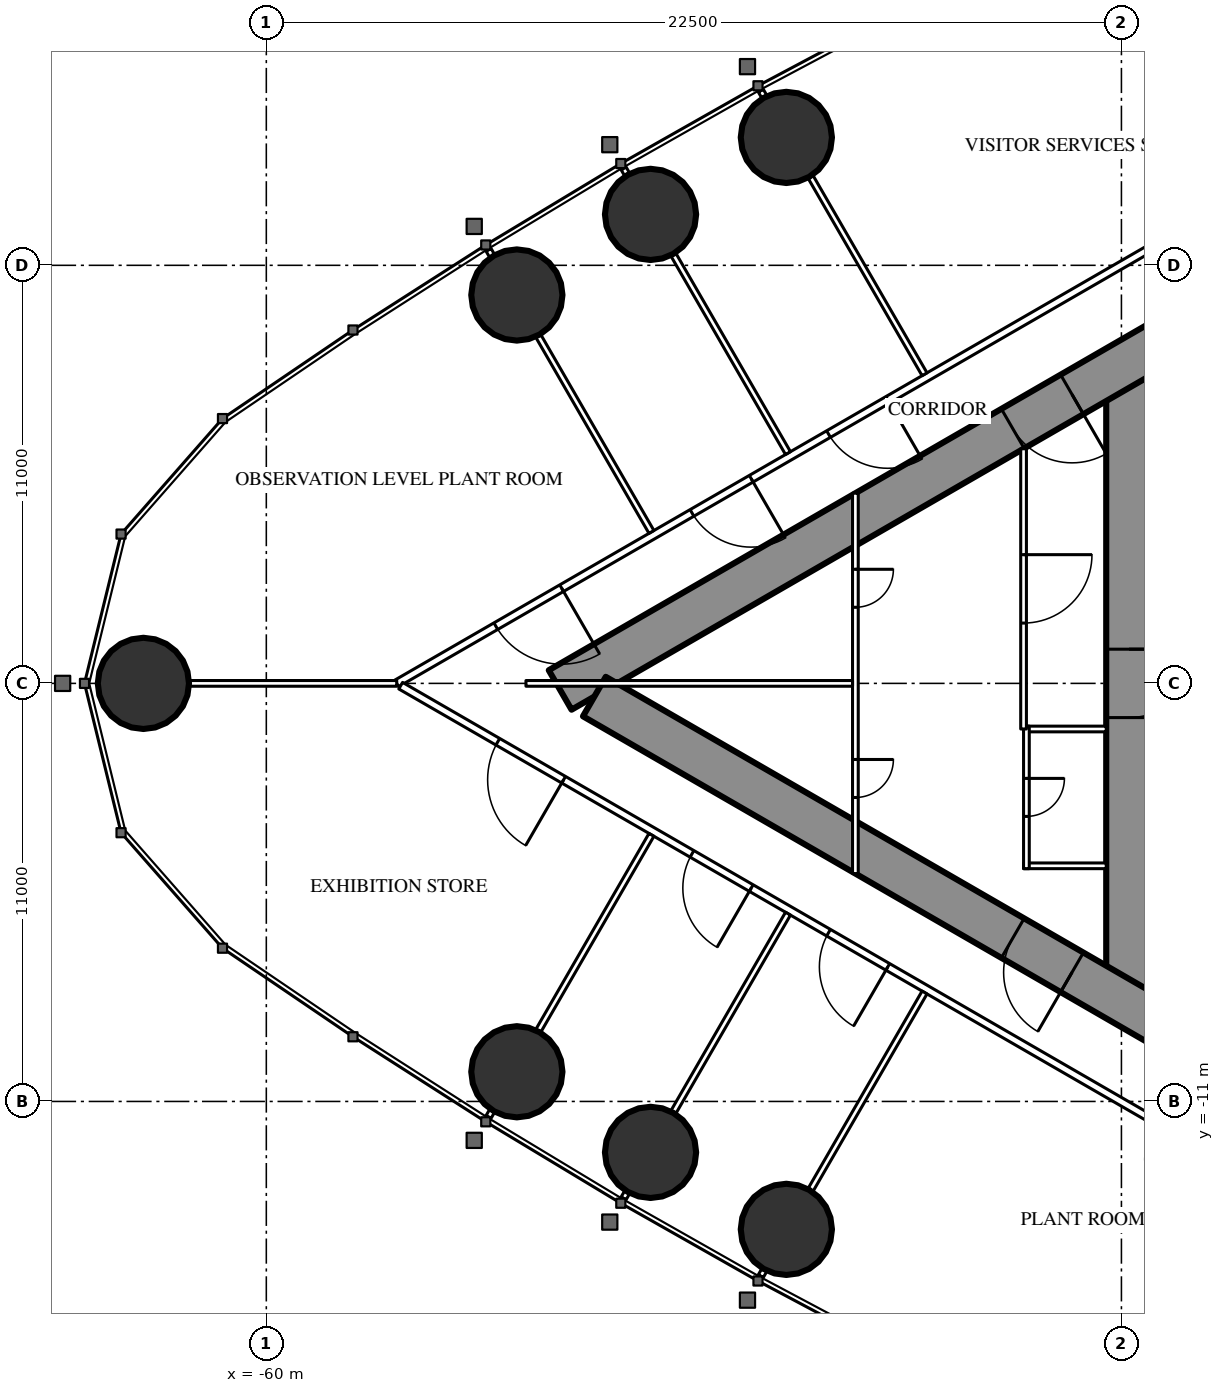
"""IFC4 building model, lengths in metres.
Left out: names, types, materials, properties, quantities, classifications, styles, units other than length and angle.
Written with IfcOpenShell. Run it as: python <this file> out.ifc"""

import sys

from ifc_helpers import new_model, si_unit, direction, frame, frame_2d, origin, origin_2d, place, context, subcontext, project, spatial, rectangle, circle, extrude, element, fill, save


model = new_model("IFC4")
c1 = context("Model", 3, precision=1e-05, world=origin(), true_north=direction((0.0, 1.0)))
c2 = subcontext(c1, "Body", "Model", "MODEL_VIEW")
j1 = project(units=[si_unit("LENGTHUNIT", "METRE"), si_unit("PLANEANGLEUNIT", "RADIAN")], contexts=[c1])
p1 = place(None, origin())
s1 = spatial("IfcSite", under=j1, at=p1, CompositionType="ELEMENT")
p2 = place(p1, origin())
s2 = spatial("IfcBuilding", under=s1, at=p2, CompositionType="ELEMENT")
p3 = place(p2, frame((0.0, 0.0, 257.3)))
s3 = spatial("IfcBuildingStorey", under=s2, at=p3, CompositionType="ELEMENT", Elevation=257.3)
for number, where, z_axis, x_axis in (
    (1, (-63.234, 0.0, 0.0), (0.0, 0.0, 1.0), (1.0, 0.0, 0.0)),
    (2, (-53.408, -10.219, 0.0), (0.0, 0.0, 1.0), (1.0, 0.0, 0.0)),
    (3, (-49.89, -12.34, 0.0), (0.0, 0.0, 1.0), (1.0, 0.0, 0.0)),
    (4, (-46.317, -14.365, 0.0), (0.0, 0.0, 1.0), (1.0, 0.0, 0.0)),
    (5, (-46.317, 14.365, 0.0), (0.0, 0.0, 1.0), (1.0, 0.0, 0.0)),
    (6, (-49.89, 12.34, 0.0), (0.0, 0.0, 1.0), (1.0, 0.0, 0.0)),
    (7, (-53.408, 10.219, 0.0), (0.0, 0.0, 1.0), (1.0, 0.0, 0.0)),
):
    element("IfcColumn", number, at=place(p3, frame(where, z_axis=z_axis, x_axis=x_axis)), inside=s3, PredefinedType="COLUMN", context=c2, shape_type="SweptSolid", body=[
        extrude(circle(Radius=1.2, at=origin_2d()), origin(), (0.0, 0.0, 1.0), 6.0),
    ])
p4 = place(p3, frame((-37.3, 8.6, 0.0), z_axis=(0.0, 0.0, 1.0), x_axis=(0.0, -1.0, 0.0)))
e8 = element("IfcWall", 8, at=p4, inside=s3, PredefinedType="SHEAR", context=c2, shape_type="SweptSolid", body=[
    extrude(rectangle(XDim=17.2, YDim=1.2, at=frame_2d((8.6, 0.0))), origin(), (0.0, 0.0, 1.0), 6.0),
])
p5 = place(p4, frame((7.7, 0.0, 0.0)))
e9 = element("IfcOpeningElement", 9, at=p5, cuts=e8, PredefinedType="OPENING", context=c2, shape_type="SweptSolid", body=[
    extrude(rectangle(XDim=1.8, YDim=2.2, at=frame_2d((0.9, 1.1))), frame((0.0, 0.61, 0.0), z_axis=(0.0, -1.0, 0.0), x_axis=(1.0, 0.0, 0.0)), (0.0, 0.0, 1.0), 1.22),
])
p6 = place(p3, frame((-27.2, 14.3, 0.0), z_axis=(0.0, 0.0, 1.0), x_axis=(-0.866026593062, -0.499997940104, 0.0)))
e10 = element("IfcWall", 10, at=p6, inside=s3, PredefinedType="SHEAR", context=c2, shape_type="SweptSolid", body=[
    extrude(rectangle(XDim=28.946, YDim=1.2, at=frame_2d((14.473, 0.0))), origin(), (0.0, 0.0, 1.0), 6.0),
])
p7 = place(p6, frame((4.6, 0.0, 0.0)))
e11 = element("IfcOpeningElement", 11, at=p7, cuts=e10, PredefinedType="OPENING", context=c2, shape_type="SweptSolid", body=[
    extrude(rectangle(XDim=1.0, YDim=2.2, at=frame_2d((0.5, 1.1))), frame((0.0, 0.61, 0.0), z_axis=(0.0, -1.0, 0.0), x_axis=(1.0, 0.0, 0.0)), (0.0, 0.0, 1.0), 1.22),
])
p8 = place(p6, frame((13.395, 0.0, 0.0)))
e12 = element("IfcOpeningElement", 12, at=p8, cuts=e10, PredefinedType="OPENING", context=c2, shape_type="SweptSolid", body=[
    extrude(rectangle(XDim=1.8, YDim=2.2, at=frame_2d((0.9, 1.1))), frame((0.0, 0.61, 0.0), z_axis=(0.0, -1.0, 0.0), x_axis=(1.0, 0.0, 0.0)), (0.0, 0.0, 1.0), 1.22),
])
p9 = place(p3, frame((-27.2, -14.3, 0.0), z_axis=(0.0, 0.0, 1.0), x_axis=(-0.866024021859, 0.500002393557, 0.0)))
e13 = element("IfcWall", 13, at=p9, inside=s3, PredefinedType="SHEAR", context=c2, shape_type="SweptSolid", body=[
    extrude(rectangle(XDim=27.907, YDim=1.2, at=frame_2d((13.954, 0.0))), origin(), (0.0, 0.0, 1.0), 6.0),
])
p10 = place(p9, frame((4.6, 0.0, 0.0)))
e14 = element("IfcOpeningElement", 14, at=p10, cuts=e13, PredefinedType="OPENING", context=c2, shape_type="SweptSolid", body=[
    extrude(rectangle(XDim=1.0, YDim=2.2, at=frame_2d((0.5, 1.1))), frame((0.0, 0.61, 0.0), z_axis=(0.0, -1.0, 0.0), x_axis=(1.0, 0.0, 0.0)), (0.0, 0.0, 1.0), 1.22),
])
p11 = place(p9, frame((13.395, 0.0, 0.0)))
e15 = element("IfcOpeningElement", 15, at=p11, cuts=e13, PredefinedType="OPENING", context=c2, shape_type="SweptSolid", body=[
    extrude(rectangle(XDim=1.8, YDim=2.2, at=frame_2d((0.9, 1.1))), frame((0.0, 0.61, 0.0), z_axis=(0.0, -1.0, 0.0), x_axis=(1.0, 0.0, 0.0)), (0.0, 0.0, 1.0), 1.22),
])
p12 = place(p3, frame((-28.681, 16.101, 0.0), z_axis=(0.0, 0.0, 1.0), x_axis=(-0.866024860443, -0.500000941094, 0.0)))
e16 = element("IfcWall", 16, at=p12, inside=s3, PredefinedType="PARTITIONING", context=c2, shape_type="SweptSolid", body=[
    extrude(rectangle(XDim=32.201, YDim=0.2, at=frame_2d((16.101, 0.0))), origin(), (0.0, 0.0, 1.0), 5.75),
])
p13 = place(p12, frame((7.166, 0.0, 0.0)))
e17 = element("IfcOpeningElement", 17, at=p13, cuts=e16, PredefinedType="OPENING", context=c2, shape_type="SweptSolid", body=[
    extrude(rectangle(XDim=2.0, YDim=2.4, at=frame_2d((1.0, 1.2))), frame((0.0, 0.11, 0.0), z_axis=(0.0, -1.0, 0.0), x_axis=(1.0, 0.0, 0.0)), (0.0, 0.0, 1.0), 0.22),
])
p14 = place(p12, frame((17.281, 0.0, 0.0)))
e18 = element("IfcOpeningElement", 18, at=p14, cuts=e16, PredefinedType="OPENING", context=c2, shape_type="SweptSolid", body=[
    extrude(rectangle(XDim=1.8, YDim=2.2, at=frame_2d((0.9, 1.1))), frame((0.0, 0.11, 0.0), z_axis=(0.0, -1.0, 0.0), x_axis=(1.0, 0.0, 0.0)), (0.0, 0.0, 1.0), 0.22),
])
p15 = place(p12, frame((21.43, 0.0, 0.0)))
e19 = element("IfcOpeningElement", 19, at=p15, cuts=e16, PredefinedType="OPENING", context=c2, shape_type="SweptSolid", body=[
    extrude(rectangle(XDim=1.8, YDim=2.2, at=frame_2d((0.9, 1.1))), frame((0.0, 0.11, 0.0), z_axis=(0.0, -1.0, 0.0), x_axis=(1.0, 0.0, 0.0)), (0.0, 0.0, 1.0), 0.22),
])
p16 = place(p12, frame((27.19, 0.0, 0.0)))
e20 = element("IfcOpeningElement", 20, at=p16, cuts=e16, PredefinedType="OPENING", context=c2, shape_type="SweptSolid", body=[
    extrude(rectangle(XDim=2.0, YDim=2.4, at=frame_2d((1.0, 1.2))), frame((0.0, 0.11, 0.0), z_axis=(0.0, -1.0, 0.0), x_axis=(1.0, 0.0, 0.0)), (0.0, 0.0, 1.0), 0.22),
])
p17 = place(p3, frame((-28.681, -16.101, 0.0), z_axis=(0.0, 0.0, 1.0), x_axis=(-0.86602501917, 0.50000066617, 0.0)))
e21 = element("IfcWall", 21, at=p17, inside=s3, PredefinedType="PARTITIONING", context=c2, shape_type="SweptSolid", body=[
    extrude(rectangle(XDim=32.081, YDim=0.2, at=frame_2d((16.041, 0.0))), origin(), (0.0, 0.0, 1.0), 5.75),
])
p18 = place(p17, frame((27.13, 0.0, 0.0)))
e22 = element("IfcOpeningElement", 22, at=p18, cuts=e21, PredefinedType="OPENING", context=c2, shape_type="SweptSolid", body=[
    extrude(rectangle(XDim=2.0, YDim=2.4, at=frame_2d((1.0, 1.2))), frame((0.0, 0.11, 0.0), z_axis=(0.0, -1.0, 0.0), x_axis=(1.0, 0.0, 0.0)), (0.0, 0.0, 1.0), 0.22),
])
p19 = place(p17, frame((21.43, 0.0, 0.0)))
e23 = element("IfcOpeningElement", 23, at=p19, cuts=e21, PredefinedType="OPENING", context=c2, shape_type="SweptSolid", body=[
    extrude(rectangle(XDim=1.8, YDim=2.2, at=frame_2d((0.9, 1.1))), frame((0.0, 0.11, 0.0), z_axis=(0.0, -1.0, 0.0), x_axis=(1.0, 0.0, 0.0)), (0.0, 0.0, 1.0), 0.22),
])
p20 = place(p17, frame((17.281, 0.0, 0.0)))
e24 = element("IfcOpeningElement", 24, at=p20, cuts=e21, PredefinedType="OPENING", context=c2, shape_type="SweptSolid", body=[
    extrude(rectangle(XDim=1.8, YDim=2.2, at=frame_2d((0.9, 1.1))), frame((0.0, 0.11, 0.0), z_axis=(0.0, -1.0, 0.0), x_axis=(1.0, 0.0, 0.0)), (0.0, 0.0, 1.0), 0.22),
])
p21 = place(p17, frame((7.166, 0.0, 0.0)))
e25 = element("IfcOpeningElement", 25, at=p21, cuts=e21, PredefinedType="OPENING", context=c2, shape_type="SweptSolid", body=[
    extrude(rectangle(XDim=2.0, YDim=2.4, at=frame_2d((1.0, 1.2))), frame((0.0, 0.11, 0.0), z_axis=(0.0, -1.0, 0.0), x_axis=(1.0, 0.0, 0.0)), (0.0, 0.0, 1.0), 0.22),
])
p22 = place(p3, frame((-42.68, 8.134, 0.0), z_axis=(0.0, 0.0, 1.0), x_axis=(-0.499984479505, 0.866034364361, 0.0)))
e26 = element("IfcWall", 26, at=p22, inside=s3, PredefinedType="PARTITIONING", context=c2, shape_type="SweptSolid", body=[
    extrude(rectangle(XDim=5.995, YDim=0.15, at=frame_2d((2.998, 0.0))), origin(), (0.0, 0.0, 1.0), 4.85),
])
p23 = place(p3, frame((-46.898, 15.439, 0.0), z_axis=(0.0, 0.0, 1.0), x_axis=(-0.500232303069, 0.865891241997, 0.0)))
e27 = element("IfcWall", 27, at=p23, inside=s3, PredefinedType="PARTITIONING", context=c2, shape_type="SweptSolid", body=[
    extrude(rectangle(XDim=0.18, YDim=0.15, at=frame_2d((0.09, 0.0))), origin(), (0.0, 0.0, 1.0), 4.85),
])
p24 = place(p3, frame((-46.274, 6.059, 0.0), z_axis=(0.0, 0.0, 1.0), x_axis=(-0.500020471368, 0.866013584312, 0.0)))
e28 = element("IfcWall", 28, at=p24, inside=s3, PredefinedType="PARTITIONING", context=c2, shape_type="SweptSolid", body=[
    extrude(rectangle(XDim=6.028, YDim=0.15, at=frame_2d((3.014, 0.0))), origin(), (0.0, 0.0, 1.0), 4.85),
])
p25 = place(p3, frame((-50.508, 13.392, 0.0), z_axis=(0.0, 0.0, 1.0), x_axis=(-0.499644091975, 0.866230789891, 0.0)))
e29 = element("IfcWall", 29, at=p25, inside=s3, PredefinedType="PARTITIONING", context=c2, shape_type="SweptSolid", body=[
    extrude(rectangle(XDim=0.18, YDim=0.15, at=frame_2d((0.09, 0.0))), origin(), (0.0, 0.0, 1.0), 4.85),
])
p26 = place(p3, frame((-49.866, 3.985, 0.0), z_axis=(0.0, 0.0, 1.0), x_axis=(-0.500000694566, 0.866025002776, 0.0)))
e30 = element("IfcWall", 30, at=p26, inside=s3, PredefinedType="PARTITIONING", context=c2, shape_type="SweptSolid", body=[
    extrude(rectangle(XDim=5.95, YDim=0.15, at=frame_2d((2.975, 0.0))), origin(), (0.0, 0.0, 1.0), 4.85),
])
p27 = place(p3, frame((-54.061, 11.25, 0.0), z_axis=(0.0, 0.0, 1.0), x_axis=(-0.500391173478, 0.865799441849, 0.0)))
e31 = element("IfcWall", 31, at=p27, inside=s3, PredefinedType="PARTITIONING", context=c2, shape_type="SweptSolid", body=[
    extrude(rectangle(XDim=0.179, YDim=0.15, at=frame_2d((0.089, 0.0))), origin(), (0.0, 0.0, 1.0), 4.85),
])
p28 = place(p3, frame((-42.68, -8.134, 0.0), z_axis=(0.0, 0.0, 1.0), x_axis=(-0.499984479505, -0.866034364361, 0.0)))
e32 = element("IfcWall", 32, at=p28, inside=s3, PredefinedType="PARTITIONING", context=c2, shape_type="SweptSolid", body=[
    extrude(rectangle(XDim=5.995, YDim=0.15, at=frame_2d((2.998, 0.0))), origin(), (0.0, 0.0, 1.0), 4.85),
])
p29 = place(p3, frame((-46.898, -15.439, 0.0), z_axis=(0.0, 0.0, 1.0), x_axis=(-0.500232303069, -0.865891241997, 0.0)))
e33 = element("IfcWall", 33, at=p29, inside=s3, PredefinedType="PARTITIONING", context=c2, shape_type="SweptSolid", body=[
    extrude(rectangle(XDim=0.18, YDim=0.15, at=frame_2d((0.09, 0.0))), origin(), (0.0, 0.0, 1.0), 4.85),
])
p30 = place(p3, frame((-46.274, -6.059, 0.0), z_axis=(0.0, 0.0, 1.0), x_axis=(-0.500020471368, -0.866013584312, 0.0)))
e34 = element("IfcWall", 34, at=p30, inside=s3, PredefinedType="PARTITIONING", context=c2, shape_type="SweptSolid", body=[
    extrude(rectangle(XDim=6.028, YDim=0.15, at=frame_2d((3.014, 0.0))), origin(), (0.0, 0.0, 1.0), 4.85),
])
p31 = place(p3, frame((-50.508, -13.392, 0.0), z_axis=(0.0, 0.0, 1.0), x_axis=(-0.499644091975, -0.866230789891, 0.0)))
e35 = element("IfcWall", 35, at=p31, inside=s3, PredefinedType="PARTITIONING", context=c2, shape_type="SweptSolid", body=[
    extrude(rectangle(XDim=0.18, YDim=0.15, at=frame_2d((0.09, 0.0))), origin(), (0.0, 0.0, 1.0), 4.85),
])
p32 = place(p3, frame((-49.866, -3.985, 0.0), z_axis=(0.0, 0.0, 1.0), x_axis=(-0.500000694566, -0.866025002776, 0.0)))
e36 = element("IfcWall", 36, at=p32, inside=s3, PredefinedType="PARTITIONING", context=c2, shape_type="SweptSolid", body=[
    extrude(rectangle(XDim=5.95, YDim=0.15, at=frame_2d((2.975, 0.0))), origin(), (0.0, 0.0, 1.0), 4.85),
])
p33 = place(p3, frame((-54.061, -11.25, 0.0), z_axis=(0.0, 0.0, 1.0), x_axis=(-0.500391173478, -0.865799441849, 0.0)))
e37 = element("IfcWall", 37, at=p33, inside=s3, PredefinedType="PARTITIONING", context=c2, shape_type="SweptSolid", body=[
    extrude(rectangle(XDim=0.179, YDim=0.15, at=frame_2d((0.089, 0.0))), origin(), (0.0, 0.0, 1.0), 4.85),
])
p34 = place(p3, frame((-56.568, 0.0, 0.0), z_axis=(0.0, 0.0, 1.0), x_axis=(-1.0, 0.0, 0.0)))
e38 = element("IfcWall", 38, at=p34, inside=s3, PredefinedType="PARTITIONING", context=c2, shape_type="SweptSolid", body=[
    extrude(rectangle(XDim=5.446, YDim=0.15, at=frame_2d((2.723, 0.0))), origin(), (0.0, 0.0, 1.0), 4.85),
])
for number, where, z_axis, x_axis in (
    (39, (-37.9, -1.2, 0.0), (0.0, 0.0, 1.0), (-1.0, 0.0, 0.0)),
    (40, (-37.9, -4.8, 0.0), (0.0, 0.0, 1.0), (-1.0, 0.0, 0.0)),
):
    element("IfcWall", number, at=place(p3, frame(where, z_axis=z_axis, x_axis=x_axis)), inside=s3, PredefinedType="PARTITIONING", context=c2, shape_type="SweptSolid", body=[
        extrude(rectangle(XDim=2.175, YDim=0.15, at=frame_2d((1.087, 0.0))), origin(), (0.0, 0.0, 1.0), 5.75),
    ])
p35 = place(p3, frame((-40.0, -1.125, 0.0), z_axis=(0.0, 0.0, 1.0), x_axis=(0.0, -1.0, 0.0)))
e41 = element("IfcWall", 41, at=p35, inside=s3, PredefinedType="PARTITIONING", context=c2, shape_type="SweptSolid", body=[
    extrude(rectangle(XDim=3.75, YDim=0.15, at=frame_2d((1.875, 0.0))), origin(), (0.0, 0.0, 1.0), 5.75),
])
p36 = place(p35, frame((1.375, 0.0, 0.0)))
e42 = element("IfcOpeningElement", 42, at=p36, cuts=e41, PredefinedType="OPENING", context=c2, shape_type="SweptSolid", body=[
    extrude(rectangle(XDim=1.0, YDim=2.2, at=frame_2d((0.5, 1.1))), frame((0.0, 0.085, 0.0), z_axis=(0.0, -1.0, 0.0), x_axis=(1.0, 0.0, 0.0)), (0.0, 0.0, 1.0), 0.17),
])
p37 = place(p3, frame((-40.075, 6.174, 0.0), z_axis=(0.0, 0.0, 1.0), x_axis=(0.0, -1.0, 0.0)))
e43 = element("IfcWall", 43, at=p37, inside=s3, PredefinedType="PARTITIONING", context=c2, shape_type="SweptSolid", body=[
    extrude(rectangle(XDim=7.374, YDim=0.15, at=frame_2d((3.687, 0.0))), origin(), (0.0, 0.0, 1.0), 5.75),
])
p38 = place(p37, frame((2.787, 0.0, 0.0)))
e44 = element("IfcOpeningElement", 44, at=p38, cuts=e43, PredefinedType="OPENING", context=c2, shape_type="SweptSolid", body=[
    extrude(rectangle(XDim=1.8, YDim=2.2, at=frame_2d((0.9, 1.1))), frame((0.0, 0.085, 0.0), z_axis=(0.0, -1.0, 0.0), x_axis=(1.0, 0.0, 0.0)), (0.0, 0.0, 1.0), 0.17),
])
p39 = place(p3, frame((-44.5, 5.005, 0.0), z_axis=(0.0, 0.0, 1.0), x_axis=(0.0, -1.0, 0.0)))
e45 = element("IfcWall", 45, at=p39, inside=s3, PredefinedType="PARTITIONING", context=c2, shape_type="SweptSolid", body=[
    extrude(rectangle(XDim=10.009, YDim=0.15, at=frame_2d((5.005, 0.0))), origin(), (0.0, 0.0, 1.0), 4.9),
])
p40 = place(p39, frame((2.002, 0.0, 0.0)))
e46 = element("IfcOpeningElement", 46, at=p40, cuts=e45, PredefinedType="OPENING", context=c2, shape_type="SweptSolid", body=[
    extrude(rectangle(XDim=1.0, YDim=2.2, at=frame_2d((0.5, 1.1))), frame((0.0, 0.085, 0.0), z_axis=(0.0, -1.0, 0.0), x_axis=(1.0, 0.0, 0.0)), (0.0, 0.0, 1.0), 0.17),
])
p41 = place(p39, frame((7.007, 0.0, 0.0)))
e47 = element("IfcOpeningElement", 47, at=p41, cuts=e45, PredefinedType="OPENING", context=c2, shape_type="SweptSolid", body=[
    extrude(rectangle(XDim=1.0, YDim=2.2, at=frame_2d((0.5, 1.1))), frame((0.0, 0.085, 0.0), z_axis=(0.0, -1.0, 0.0), x_axis=(1.0, 0.0, 0.0)), (0.0, 0.0, 1.0), 0.17),
])
p42 = place(p3, frame((-44.575, 0.0, 0.0), z_axis=(0.0, 0.0, 1.0), x_axis=(-1.0, 0.0, 0.0)))
e48 = element("IfcWall", 48, at=p42, inside=s3, PredefinedType="PARTITIONING", context=c2, shape_type="SweptSolid", body=[
    extrude(rectangle(XDim=8.593, YDim=0.15, at=frame_2d((4.297, 0.0))), origin(), (0.0, 0.0, 1.0), 4.85),
])
p43 = place(p14, origin())
e49 = element("IfcDoor", 49, at=p43, inside=s3, OperationType="DOUBLE_DOOR_SINGLE_SWING", PredefinedType="DOOR", context=c2, shape_type="SweptSolid", body=[
    extrude(rectangle(XDim=1.8, YDim=2.2, at=frame_2d((0.9, 1.1))), frame((0.0, 0.025, 0.0), z_axis=(0.0, -1.0, 0.0), x_axis=(1.0, 0.0, 0.0)), (0.0, 0.0, 1.0), 0.05),
])
fill(e18, e49)
p44 = place(p15, origin())
e50 = element("IfcDoor", 50, at=p44, inside=s3, OperationType="DOUBLE_DOOR_SINGLE_SWING", PredefinedType="DOOR", context=c2, shape_type="SweptSolid", body=[
    extrude(rectangle(XDim=1.8, YDim=2.2, at=frame_2d((0.9, 1.1))), frame((0.0, 0.025, 0.0), z_axis=(0.0, -1.0, 0.0), x_axis=(1.0, 0.0, 0.0)), (0.0, 0.0, 1.0), 0.05),
])
fill(e19, e50)
p45 = place(p16, origin())
e51 = element("IfcDoor", 51, at=p45, inside=s3, OperationType="DOUBLE_DOOR_SINGLE_SWING", PredefinedType="DOOR", context=c2, shape_type="SweptSolid", body=[
    extrude(rectangle(XDim=2.0, YDim=2.4, at=frame_2d((1.0, 1.2))), frame((0.0, 0.025, 0.0), z_axis=(0.0, -1.0, 0.0), x_axis=(1.0, 0.0, 0.0)), (0.0, 0.0, 1.0), 0.05),
])
fill(e20, e51)
p46 = place(p18, origin())
e52 = element("IfcDoor", 52, at=p46, inside=s3, OperationType="DOUBLE_DOOR_SINGLE_SWING", PredefinedType="DOOR", context=c2, shape_type="SweptSolid", body=[
    extrude(rectangle(XDim=2.0, YDim=2.4, at=frame_2d((1.0, 1.2))), frame((0.0, 0.025, 0.0), z_axis=(0.0, -1.0, 0.0), x_axis=(1.0, 0.0, 0.0)), (0.0, 0.0, 1.0), 0.05),
])
fill(e22, e52)
p47 = place(p19, origin())
e53 = element("IfcDoor", 53, at=p47, inside=s3, OperationType="DOUBLE_DOOR_SINGLE_SWING", PredefinedType="DOOR", context=c2, shape_type="SweptSolid", body=[
    extrude(rectangle(XDim=1.8, YDim=2.2, at=frame_2d((0.9, 1.1))), frame((0.0, 0.025, 0.0), z_axis=(0.0, -1.0, 0.0), x_axis=(1.0, 0.0, 0.0)), (0.0, 0.0, 1.0), 0.05),
])
fill(e23, e53)
p48 = place(p20, origin())
e54 = element("IfcDoor", 54, at=p48, inside=s3, OperationType="DOUBLE_DOOR_SINGLE_SWING", PredefinedType="DOOR", context=c2, shape_type="SweptSolid", body=[
    extrude(rectangle(XDim=1.8, YDim=2.2, at=frame_2d((0.9, 1.1))), frame((0.0, 0.025, 0.0), z_axis=(0.0, -1.0, 0.0), x_axis=(1.0, 0.0, 0.0)), (0.0, 0.0, 1.0), 0.05),
])
fill(e24, e54)
p49 = place(p36, origin())
e55 = element("IfcDoor", 55, at=p49, inside=s3, OperationType="SINGLE_SWING_LEFT", PredefinedType="DOOR", context=c2, shape_type="SweptSolid", body=[
    extrude(rectangle(XDim=1.0, YDim=2.2, at=frame_2d((0.5, 1.1))), frame((0.0, 0.025, 0.0), z_axis=(0.0, -1.0, 0.0), x_axis=(1.0, 0.0, 0.0)), (0.0, 0.0, 1.0), 0.05),
])
fill(e42, e55)
p50 = place(p38, origin())
e56 = element("IfcDoor", 56, at=p50, inside=s3, OperationType="DOUBLE_DOOR_SINGLE_SWING", PredefinedType="DOOR", context=c2, shape_type="SweptSolid", body=[
    extrude(rectangle(XDim=1.8, YDim=2.2, at=frame_2d((0.9, 1.1))), frame((0.0, 0.025, 0.0), z_axis=(0.0, -1.0, 0.0), x_axis=(1.0, 0.0, 0.0)), (0.0, 0.0, 1.0), 0.05),
])
fill(e44, e56)
p51 = place(p40, origin())
e57 = element("IfcDoor", 57, at=p51, inside=s3, OperationType="SINGLE_SWING_LEFT", PredefinedType="DOOR", context=c2, shape_type="SweptSolid", body=[
    extrude(rectangle(XDim=1.0, YDim=2.2, at=frame_2d((0.5, 1.1))), frame((0.0, 0.025, 0.0), z_axis=(0.0, -1.0, 0.0), x_axis=(1.0, 0.0, 0.0)), (0.0, 0.0, 1.0), 0.05),
])
fill(e46, e57)
p52 = place(p41, origin())
e58 = element("IfcDoor", 58, at=p52, inside=s3, OperationType="SINGLE_SWING_LEFT", PredefinedType="DOOR", context=c2, shape_type="SweptSolid", body=[
    extrude(rectangle(XDim=1.0, YDim=2.2, at=frame_2d((0.5, 1.1))), frame((0.0, 0.025, 0.0), z_axis=(0.0, -1.0, 0.0), x_axis=(1.0, 0.0, 0.0)), (0.0, 0.0, 1.0), 0.05),
])
fill(e47, e58)
p53 = place(p8, origin())
e59 = element("IfcDoor", 59, at=p53, inside=s3, OperationType="DOUBLE_DOOR_SINGLE_SWING", PredefinedType="DOOR", context=c2, shape_type="SweptSolid", body=[
    extrude(rectangle(XDim=1.8, YDim=2.2, at=frame_2d((0.9, 1.1))), frame((0.0, 0.025, 0.0), z_axis=(0.0, -1.0, 0.0), x_axis=(1.0, 0.0, 0.0)), (0.0, 0.0, 1.0), 0.05),
])
fill(e12, e59)
p54 = place(p11, origin())
e60 = element("IfcDoor", 60, at=p54, inside=s3, OperationType="DOUBLE_DOOR_SINGLE_SWING", PredefinedType="DOOR", context=c2, shape_type="SweptSolid", body=[
    extrude(rectangle(XDim=1.8, YDim=2.2, at=frame_2d((0.9, 1.1))), frame((0.0, 0.025, 0.0), z_axis=(0.0, -1.0, 0.0), x_axis=(1.0, 0.0, 0.0)), (0.0, 0.0, 1.0), 0.05),
])
fill(e15, e60)
p55 = place(p5, origin())
e61 = element("IfcDoor", 61, at=p55, inside=s3, OperationType="DOUBLE_DOOR_SINGLE_SWING", PredefinedType="DOOR", context=c2, shape_type="SweptSolid", body=[
    extrude(rectangle(XDim=1.8, YDim=2.2, at=frame_2d((0.9, 1.1))), frame((0.0, 0.025, 0.0), z_axis=(0.0, -1.0, 0.0), x_axis=(1.0, 0.0, 0.0)), (0.0, 0.0, 1.0), 0.05),
])
fill(e9, e61)
save(model, sys.argv[1])
